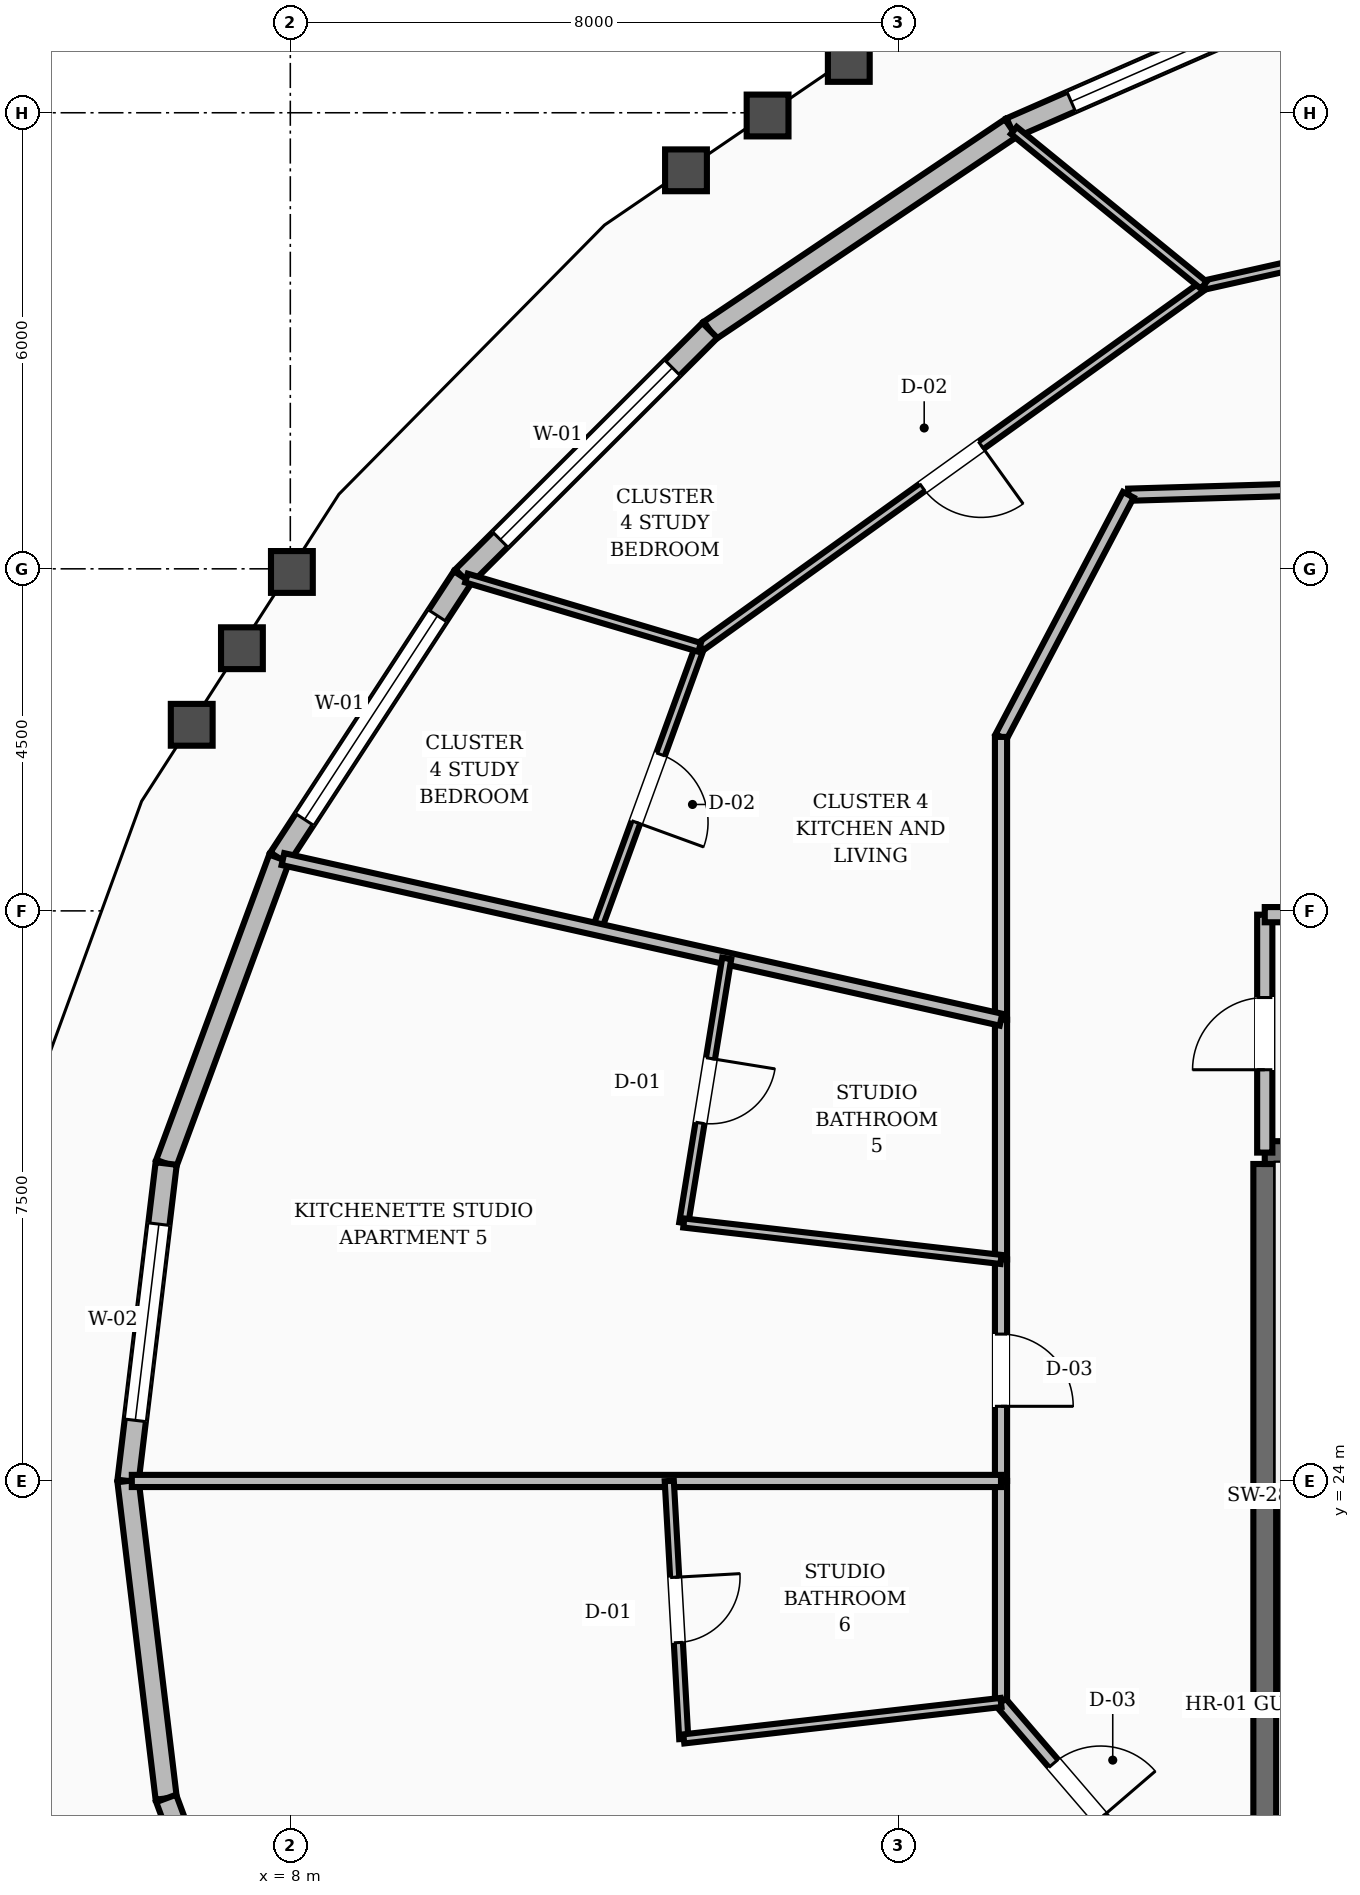
"""IFC4 building model, lengths in metres.
Left out: names, types, materials, properties, quantities, classifications, styles, units other than length and angle.
Written with IfcOpenShell. Run it as: python <this file> out.ifc"""

import sys

from ifc_helpers import new_model, si_unit, direction, frame, frame_2d, origin, place, context, subcontext, project, spatial, rectangle, extrude, element, fill, save


model = new_model("IFC4")
c1 = context("Model", 3, precision=1e-05, world=origin(), true_north=direction((0.0, 1.0)))
c2 = subcontext(c1, "Body", "Model", "MODEL_VIEW")
j1 = project(units=[si_unit("LENGTHUNIT", "METRE"), si_unit("PLANEANGLEUNIT", "RADIAN")], contexts=[c1])
p1 = place(None, origin())
s1 = spatial("IfcSite", under=j1, at=p1, CompositionType="ELEMENT")
p2 = place(p1, origin())
s2 = spatial("IfcBuilding", under=s1, at=p2, CompositionType="ELEMENT")
p3 = place(p2, frame((0.0, 0.0, 167.6)))
s3 = spatial("IfcBuildingStorey", under=s2, at=p3, CompositionType="ELEMENT", Elevation=167.6)
p4 = place(p3, frame((20.82, 19.43, 0.0), z_axis=(0.0, 0.0, 1.0), x_axis=(0.0, 1.0, 0.0)))
e1 = element("IfcWall", 1, at=p4, inside=s3, PredefinedType="SHEAR", context=c2, shape_type="SweptSolid", body=[
    extrude(rectangle(XDim=8.74, YDim=0.3, at=frame_2d((4.37, 0.0))), origin(), (0.0, 0.0, 1.0), 3.6),
])
p5 = place(p3, frame((20.82, 28.32, 0.0), z_axis=(0.0, 0.0, 1.0), x_axis=(1.0, 0.0, 0.0)))
e2 = element("IfcWall", 2, at=p5, inside=s3, PredefinedType="SHEAR", context=c2, shape_type="SweptSolid", body=[
    extrude(rectangle(XDim=3.6, YDim=0.3, at=frame_2d((1.8, 0.0))), origin(), (0.0, 0.0, 1.0), 3.6),
])
p6 = place(p3, frame((21.999, 43.777, 0.0), z_axis=(0.0, 0.0, 1.0), x_axis=(-0.916070979736, -0.401016159381, 0.0)))
e3 = element("IfcWall", 3, at=p6, inside=s3, PredefinedType="STANDARD", context=c2, shape_type="SweptSolid", body=[
    extrude(rectangle(XDim=4.933, YDim=0.28, at=frame_2d((2.466, 0.0))), origin(), (0.0, 0.0, 1.0), 2.82),
])
p7 = place(p6, frame((0.866, 0.0, 0.8)))
e4 = element("IfcOpeningElement", 4, at=p7, cuts=e3, PredefinedType="OPENING", context=c2, shape_type="SweptSolid", body=[
    extrude(rectangle(XDim=3.2, YDim=1.65, at=frame_2d((1.6, 0.825))), frame((0.0, 0.15, 0.0), z_axis=(0.0, -1.0, 0.0), x_axis=(1.0, 0.0, 0.0)), (0.0, 0.0, 1.0), 0.3),
])
p8 = place(p3, frame((17.48, 41.799, 0.0), z_axis=(0.0, 0.0, 1.0), x_axis=(-0.829911180813, -0.557895538575, 0.0)))
e5 = element("IfcWall", 5, at=p8, inside=s3, PredefinedType="STANDARD", context=c2, shape_type="SweptSolid", body=[
    extrude(rectangle(XDim=4.772, YDim=0.28, at=frame_2d((2.386, 0.0))), origin(), (0.0, 0.0, 1.0), 2.82),
])
p9 = place(p3, frame((13.52, 39.137, 0.0), z_axis=(0.0, 0.0, 1.0), x_axis=(-0.707797600077, -0.706415286729, 0.0)))
e6 = element("IfcWall", 6, at=p9, inside=s3, PredefinedType="STANDARD", context=c2, shape_type="SweptSolid", body=[
    extrude(rectangle(XDim=4.592, YDim=0.28, at=frame_2d((2.296, 0.0))), origin(), (0.0, 0.0, 1.0), 2.82),
])
p10 = place(p9, frame((0.696, 0.0, 0.8)))
e7 = element("IfcOpeningElement", 7, at=p10, cuts=e6, PredefinedType="OPENING", context=c2, shape_type="SweptSolid", body=[
    extrude(rectangle(XDim=3.2, YDim=1.65, at=frame_2d((1.6, 0.825))), frame((0.0, 0.15, 0.0), z_axis=(0.0, -1.0, 0.0), x_axis=(1.0, 0.0, 0.0)), (0.0, 0.0, 1.0), 0.3),
])
p11 = place(p3, frame((10.269, 35.893, 0.0), z_axis=(0.0, 0.0, 1.0), x_axis=(-0.546488523779, -0.837466592395, 0.0)))
e8 = element("IfcWall", 8, at=p11, inside=s3, PredefinedType="STANDARD", context=c2, shape_type="SweptSolid", body=[
    extrude(rectangle(XDim=4.419, YDim=0.28, at=frame_2d((2.209, 0.0))), origin(), (0.0, 0.0, 1.0), 2.82),
])
p12 = place(p11, frame((0.61, 0.0, 0.8)))
e9 = element("IfcOpeningElement", 9, at=p12, cuts=e8, PredefinedType="OPENING", context=c2, shape_type="SweptSolid", body=[
    extrude(rectangle(XDim=3.2, YDim=1.65, at=frame_2d((1.6, 0.825))), frame((0.0, 0.15, 0.0), z_axis=(0.0, -1.0, 0.0), x_axis=(1.0, 0.0, 0.0)), (0.0, 0.0, 1.0), 0.3),
])
p13 = place(p3, frame((7.854, 32.192, 0.0), z_axis=(0.0, 0.0, 1.0), x_axis=(-0.34732178329, -0.937746009777, 0.0)))
e10 = element("IfcWall", 10, at=p13, inside=s3, PredefinedType="STANDARD", context=c2, shape_type="SweptSolid", body=[
    extrude(rectangle(XDim=4.282, YDim=0.28, at=frame_2d((2.141, 0.0))), origin(), (0.0, 0.0, 1.0), 2.82),
])
p14 = place(p3, frame((6.367, 28.176, 0.0), z_axis=(0.0, 0.0, 1.0), x_axis=(-0.119390105597, -0.992847421654, 0.0)))
e11 = element("IfcWall", 11, at=p14, inside=s3, PredefinedType="STANDARD", context=c2, shape_type="SweptSolid", body=[
    extrude(rectangle(XDim=4.206, YDim=0.28, at=frame_2d((2.103, 0.0))), origin(), (0.0, 0.0, 1.0), 2.82),
])
p15 = place(p14, frame((0.803, 0.0, 0.8)))
e12 = element("IfcOpeningElement", 12, at=p15, cuts=e11, PredefinedType="OPENING", context=c2, shape_type="SweptSolid", body=[
    extrude(rectangle(XDim=2.6, YDim=1.65, at=frame_2d((1.3, 0.825))), frame((0.0, 0.15, 0.0), z_axis=(0.0, -1.0, 0.0), x_axis=(1.0, 0.0, 0.0)), (0.0, 0.0, 1.0), 0.3),
])
p16 = place(p3, frame((5.865, 24.0, 0.0), z_axis=(0.0, 0.0, 1.0), x_axis=(0.119390105597, -0.992847421654, 0.0)))
e13 = element("IfcWall", 13, at=p16, inside=s3, PredefinedType="STANDARD", context=c2, shape_type="SweptSolid", body=[
    extrude(rectangle(XDim=4.206, YDim=0.28, at=frame_2d((2.103, 0.0))), origin(), (0.0, 0.0, 1.0), 2.82),
])
p17 = place(p3, frame((6.367, 19.824, 0.0), z_axis=(0.0, 0.0, 1.0), x_axis=(0.34732178329, -0.937746009777, 0.0)))
e14 = element("IfcWall", 14, at=p17, inside=s3, PredefinedType="STANDARD", context=c2, shape_type="SweptSolid", body=[
    extrude(rectangle(XDim=4.282, YDim=0.28, at=frame_2d((2.141, 0.0))), origin(), (0.0, 0.0, 1.0), 2.82),
])
p18 = place(p3, frame((20.82, 28.32, 0.0), z_axis=(0.0, 0.0, 1.0), x_axis=(0.0, 1.0, 0.0)))
e15 = element("IfcWall", 15, at=p18, inside=s3, PredefinedType="SOLIDWALL", context=c2, shape_type="SweptSolid", body=[
    extrude(rectangle(XDim=3.13, YDim=0.2, at=frame_2d((1.565, 0.0))), origin(), (0.0, 0.0, 1.0), 2.8),
])
p19 = place(p18, frame((1.09, 0.0, 0.0)))
e16 = element("IfcOpeningElement", 16, at=p19, cuts=e15, PredefinedType="OPENING", context=c2, shape_type="SweptSolid", body=[
    extrude(rectangle(XDim=0.95, YDim=2.1, at=frame_2d((0.475, 1.05))), frame((0.0, 0.11, 0.0), z_axis=(0.0, -1.0, 0.0), x_axis=(1.0, 0.0, 0.0)), (0.0, 0.0, 1.0), 0.22),
])
p20 = place(p3, frame((20.82, 31.45, 0.0), z_axis=(0.0, 0.0, 1.0), x_axis=(1.0, 0.0, 0.0)))
e17 = element("IfcWall", 17, at=p20, inside=s3, PredefinedType="SOLIDWALL", context=c2, shape_type="SweptSolid", body=[
    extrude(rectangle(XDim=3.98, YDim=0.2, at=frame_2d((1.99, 0.0))), origin(), (0.0, 0.0, 1.0), 2.8),
])
p21 = place(p3, frame((23.247, 37.1, 0.0), z_axis=(0.0, 0.0, 1.0), x_axis=(-0.999561990195, -0.029594387265, 0.0)))
e18 = element("IfcWall", 18, at=p21, inside=s3, PredefinedType="SOLIDWALL", context=c2, shape_type="SweptSolid", body=[
    extrude(rectangle(XDim=4.224, YDim=0.16, at=frame_2d((2.112, 0.0))), origin(), (0.0, 0.0, 1.0), 2.8),
])
p22 = place(p3, frame((19.025, 36.975, 0.0), z_axis=(0.0, 0.0, 1.0), x_axis=(-0.46527115782, -0.885168204185, 0.0)))
e19 = element("IfcWall", 19, at=p22, inside=s3, PredefinedType="SOLIDWALL", context=c2, shape_type="SweptSolid", body=[
    extrude(rectangle(XDim=3.6, YDim=0.16, at=frame_2d((1.8, 0.0))), origin(), (0.0, 0.0, 1.0), 2.8),
])
p23 = place(p3, frame((17.35, 33.789, 0.0), z_axis=(0.0, 0.0, 1.0), x_axis=(0.0, -1.0, 0.0)))
e20 = element("IfcWall", 20, at=p23, inside=s3, PredefinedType="SOLIDWALL", context=c2, shape_type="SweptSolid", body=[
    extrude(rectangle(XDim=3.721, YDim=0.16, at=frame_2d((1.86, 0.0))), origin(), (0.0, 0.0, 1.0), 2.8),
])
p24 = place(p3, frame((17.35, 30.068, 0.0), z_axis=(0.0, 0.0, 1.0), x_axis=(0.0, -1.0, 0.0)))
e21 = element("IfcWall", 21, at=p24, inside=s3, PredefinedType="SOLIDWALL", context=c2, shape_type="SweptSolid", body=[
    extrude(rectangle(XDim=3.154, YDim=0.16, at=frame_2d((1.577, 0.0))), origin(), (0.0, 0.0, 1.0), 2.8),
])
p25 = place(p3, frame((17.35, 26.914, 0.0), z_axis=(0.0, 0.0, 1.0), x_axis=(0.0, -1.0, 0.0)))
e22 = element("IfcWall", 22, at=p25, inside=s3, PredefinedType="SOLIDWALL", context=c2, shape_type="SweptSolid", body=[
    extrude(rectangle(XDim=2.914, YDim=0.16, at=frame_2d((1.457, 0.0))), origin(), (0.0, 0.0, 1.0), 2.8),
])
p26 = place(p25, frame((0.982, 0.0, 0.0)))
e23 = element("IfcOpeningElement", 23, at=p26, cuts=e22, PredefinedType="OPENING", context=c2, shape_type="SweptSolid", body=[
    extrude(rectangle(XDim=0.95, YDim=2.1, at=frame_2d((0.475, 1.05))), frame((0.0, 0.09, 0.0), z_axis=(0.0, -1.0, 0.0), x_axis=(1.0, 0.0, 0.0)), (0.0, 0.0, 1.0), 0.18),
])
p27 = place(p3, frame((17.35, 24.0, 0.0), z_axis=(0.0, 0.0, 1.0), x_axis=(0.0, -1.0, 0.0)))
e24 = element("IfcWall", 24, at=p27, inside=s3, PredefinedType="SOLIDWALL", context=c2, shape_type="SweptSolid", body=[
    extrude(rectangle(XDim=2.914, YDim=0.16, at=frame_2d((1.457, 0.0))), origin(), (0.0, 0.0, 1.0), 2.8),
])
p28 = place(p3, frame((17.35, 21.086, 0.0), z_axis=(0.0, 0.0, 1.0), x_axis=(0.652022797448, -0.758199361388, 0.0)))
e25 = element("IfcWall", 25, at=p28, inside=s3, PredefinedType="SOLIDWALL", context=c2, shape_type="SweptSolid", body=[
    extrude(rectangle(XDim=3.067, YDim=0.16, at=frame_2d((1.534, 0.0))), origin(), (0.0, 0.0, 1.0), 2.8),
])
p29 = place(p28, frame((1.059, 0.0, 0.0)))
e26 = element("IfcOpeningElement", 26, at=p29, cuts=e25, PredefinedType="OPENING", context=c2, shape_type="SweptSolid", body=[
    extrude(rectangle(XDim=0.95, YDim=2.1, at=frame_2d((0.475, 1.05))), frame((0.0, 0.09, 0.0), z_axis=(0.0, -1.0, 0.0), x_axis=(1.0, 0.0, 0.0)), (0.0, 0.0, 1.0), 0.18),
])
p30 = place(p3, frame((27.998, 41.521, 0.0), z_axis=(0.0, 0.0, 1.0), x_axis=(-0.975756725435, -0.218857973964, 0.0)))
e27 = element("IfcWall", 27, at=p30, inside=s3, PredefinedType="PARTITIONING", context=c2, shape_type="SweptSolid", body=[
    extrude(rectangle(XDim=8.179, YDim=0.12, at=frame_2d((4.089, 0.0))), origin(), (0.0, 0.0, 1.0), 2.8),
])
p31 = place(p30, frame((5.011, 0.0, 0.0)))
e28 = element("IfcOpeningElement", 28, at=p31, cuts=e27, PredefinedType="OPENING", context=c2, shape_type="SweptSolid", body=[
    extrude(rectangle(XDim=0.95, YDim=2.1, at=frame_2d((0.475, 1.05))), frame((0.0, 0.07, 0.0), z_axis=(0.0, -1.0, 0.0), x_axis=(1.0, 0.0, 0.0)), (0.0, 0.0, 1.0), 0.14),
])
p32 = place(p3, frame((20.018, 39.731, 0.0), z_axis=(0.0, 0.0, 1.0), x_axis=(-0.812175175791, -0.583413647277, 0.0)))
e29 = element("IfcWall", 29, at=p32, inside=s3, PredefinedType="PARTITIONING", context=c2, shape_type="SweptSolid", body=[
    extrude(rectangle(XDim=8.167, YDim=0.12, at=frame_2d((4.083, 0.0))), origin(), (0.0, 0.0, 1.0), 2.8),
])
p33 = place(p32, frame((3.608, 0.0, 0.0)))
e30 = element("IfcOpeningElement", 30, at=p33, cuts=e29, PredefinedType="OPENING", context=c2, shape_type="SweptSolid", body=[
    extrude(rectangle(XDim=0.95, YDim=2.1, at=frame_2d((0.475, 1.05))), frame((0.0, 0.07, 0.0), z_axis=(0.0, -1.0, 0.0), x_axis=(1.0, 0.0, 0.0)), (0.0, 0.0, 1.0), 0.14),
])
p34 = place(p3, frame((20.018, 39.731, 0.0), z_axis=(0.0, 0.0, 1.0), x_axis=(-0.775258339424, 0.631644288467, 0.0)))
e31 = element("IfcWall", 31, at=p34, inside=s3, PredefinedType="PARTITIONING", context=c2, shape_type="SweptSolid", body=[
    extrude(rectangle(XDim=3.223, YDim=0.12, at=frame_2d((1.612, 0.0))), origin(), (0.0, 0.0, 1.0), 2.8),
])
p35 = place(p3, frame((13.385, 34.967, 0.0), z_axis=(0.0, 0.0, 1.0), x_axis=(-0.34255715009, -0.939496992503, 0.0)))
e32 = element("IfcWall", 32, at=p35, inside=s3, PredefinedType="PARTITIONING", context=c2, shape_type="SweptSolid", body=[
    extrude(rectangle(XDim=3.948, YDim=0.12, at=frame_2d((1.974, 0.0))), origin(), (0.0, 0.0, 1.0), 2.8),
])
p36 = place(p35, frame((1.499, 0.0, 0.0)))
e33 = element("IfcOpeningElement", 33, at=p36, cuts=e32, PredefinedType="OPENING", context=c2, shape_type="SweptSolid", body=[
    extrude(rectangle(XDim=0.95, YDim=2.1, at=frame_2d((0.475, 1.05))), frame((0.0, 0.07, 0.0), z_axis=(0.0, -1.0, 0.0), x_axis=(1.0, 0.0, 0.0)), (0.0, 0.0, 1.0), 0.14),
])
p37 = place(p3, frame((13.385, 34.967, 0.0), z_axis=(0.0, 0.0, 1.0), x_axis=(-0.958568452923, 0.284862284378, 0.0)))
e34 = element("IfcWall", 34, at=p37, inside=s3, PredefinedType="PARTITIONING", context=c2, shape_type="SweptSolid", body=[
    extrude(rectangle(XDim=3.2, YDim=0.12, at=frame_2d((1.6, 0.0))), origin(), (0.0, 0.0, 1.0), 2.8),
])
p38 = place(p3, frame((17.35, 30.068, 0.0), z_axis=(0.0, 0.0, 1.0), x_axis=(-0.975886456244, 0.218278777072, 0.0)))
e35 = element("IfcWall", 35, at=p38, inside=s3, PredefinedType="SOLIDWALL", context=c2, shape_type="SweptSolid", body=[
    extrude(rectangle(XDim=9.68, YDim=0.16, at=frame_2d((4.84, 0.0))), origin(), (0.0, 0.0, 1.0), 2.8),
])
p39 = place(p3, frame((13.742, 30.875, 0.0), z_axis=(0.0, 0.0, 1.0), x_axis=(-0.160244329289, -0.987077380417, 0.0)))
e36 = element("IfcWall", 36, at=p39, inside=s3, PredefinedType="PARTITIONING", context=c2, shape_type="SweptSolid", body=[
    extrude(rectangle(XDim=3.527, YDim=0.12, at=frame_2d((1.764, 0.0))), origin(), (0.0, 0.0, 1.0), 2.8),
])
p40 = place(p39, frame((1.333, 0.0, 0.0)))
e37 = element("IfcOpeningElement", 37, at=p40, cuts=e36, PredefinedType="OPENING", context=c2, shape_type="SweptSolid", body=[
    extrude(rectangle(XDim=0.86, YDim=2.1, at=frame_2d((0.43, 1.05))), frame((0.0, 0.07, 0.0), z_axis=(0.0, -1.0, 0.0), x_axis=(1.0, 0.0, 0.0)), (0.0, 0.0, 1.0), 0.14),
])
p41 = place(p3, frame((17.35, 26.914, 0.0), z_axis=(0.0, 0.0, 1.0), x_axis=(-0.993458472939, 0.114193968957, 0.0)))
e38 = element("IfcWall", 38, at=p41, inside=s3, PredefinedType="PARTITIONING", context=c2, shape_type="SweptSolid", body=[
    extrude(rectangle(XDim=4.201, YDim=0.12, at=frame_2d((2.101, 0.0))), origin(), (0.0, 0.0, 1.0), 2.8),
])
p42 = place(p3, frame((17.35, 24.0, 0.0), z_axis=(0.0, 0.0, 1.0), x_axis=(-1.0, 0.0, 0.0)))
e39 = element("IfcWall", 39, at=p42, inside=s3, PredefinedType="SOLIDWALL", context=c2, shape_type="SweptSolid", body=[
    extrude(rectangle(XDim=11.435, YDim=0.16, at=frame_2d((5.718, 0.0))), origin(), (0.0, 0.0, 1.0), 2.8),
])
p43 = place(p3, frame((12.986, 24.0, 0.0), z_axis=(0.0, 0.0, 1.0), x_axis=(0.056166143668, -0.998421436221, 0.0)))
e40 = element("IfcWall", 40, at=p43, inside=s3, PredefinedType="PARTITIONING", context=c2, shape_type="SweptSolid", body=[
    extrude(rectangle(XDim=3.399, YDim=0.12, at=frame_2d((1.7, 0.0))), origin(), (0.0, 0.0, 1.0), 2.8),
])
p44 = place(p43, frame((1.27, 0.0, 0.0)))
e41 = element("IfcOpeningElement", 41, at=p44, cuts=e40, PredefinedType="OPENING", context=c2, shape_type="SweptSolid", body=[
    extrude(rectangle(XDim=0.86, YDim=2.1, at=frame_2d((0.43, 1.05))), frame((0.0, 0.07, 0.0), z_axis=(0.0, -1.0, 0.0), x_axis=(1.0, 0.0, 0.0)), (0.0, 0.0, 1.0), 0.14),
])
p45 = place(p3, frame((17.35, 21.086, 0.0), z_axis=(0.0, 0.0, 1.0), x_axis=(-0.993458472939, -0.114193968957, 0.0)))
e42 = element("IfcWall", 42, at=p45, inside=s3, PredefinedType="PARTITIONING", context=c2, shape_type="SweptSolid", body=[
    extrude(rectangle(XDim=4.201, YDim=0.12, at=frame_2d((2.101, 0.0))), origin(), (0.0, 0.0, 1.0), 2.8),
])
p46 = place(p7, origin())
e43 = element("IfcWindow", 43, at=p46, inside=s3, PartitioningType="SINGLE_PANEL", PredefinedType="WINDOW", context=c2, shape_type="SweptSolid", body=[
    extrude(rectangle(XDim=3.2, YDim=1.65, at=frame_2d((1.6, 0.825))), frame((0.0, 0.03, 0.0), z_axis=(0.0, -1.0, 0.0), x_axis=(1.0, 0.0, 0.0)), (0.0, 0.0, 1.0), 0.06),
])
fill(e4, e43)
p47 = place(p10, origin())
e44 = element("IfcWindow", 44, at=p47, inside=s3, PartitioningType="SINGLE_PANEL", PredefinedType="WINDOW", context=c2, shape_type="SweptSolid", body=[
    extrude(rectangle(XDim=3.2, YDim=1.65, at=frame_2d((1.6, 0.825))), frame((0.0, 0.03, 0.0), z_axis=(0.0, -1.0, 0.0), x_axis=(1.0, 0.0, 0.0)), (0.0, 0.0, 1.0), 0.06),
])
fill(e7, e44)
p48 = place(p12, origin())
e45 = element("IfcWindow", 45, at=p48, inside=s3, PartitioningType="SINGLE_PANEL", PredefinedType="WINDOW", context=c2, shape_type="SweptSolid", body=[
    extrude(rectangle(XDim=3.2, YDim=1.65, at=frame_2d((1.6, 0.825))), frame((0.0, 0.03, 0.0), z_axis=(0.0, -1.0, 0.0), x_axis=(1.0, 0.0, 0.0)), (0.0, 0.0, 1.0), 0.06),
])
fill(e9, e45)
p49 = place(p15, origin())
e46 = element("IfcWindow", 46, at=p49, inside=s3, PartitioningType="SINGLE_PANEL", PredefinedType="WINDOW", context=c2, shape_type="SweptSolid", body=[
    extrude(rectangle(XDim=2.6, YDim=1.65, at=frame_2d((1.3, 0.825))), frame((0.0, 0.03, 0.0), z_axis=(0.0, -1.0, 0.0), x_axis=(1.0, 0.0, 0.0)), (0.0, 0.0, 1.0), 0.06),
])
fill(e12, e46)
p50 = place(p19, origin())
e47 = element("IfcDoor", 47, at=p50, inside=s3, OperationType="SINGLE_SWING_LEFT", PredefinedType="DOOR", context=c2, shape_type="SweptSolid", body=[
    extrude(rectangle(XDim=0.95, YDim=2.1, at=frame_2d((0.475, 1.05))), frame((0.0, 0.025, 0.0), z_axis=(0.0, -1.0, 0.0), x_axis=(1.0, 0.0, 0.0)), (0.0, 0.0, 1.0), 0.05),
])
fill(e16, e47)
p51 = place(p33, origin())
e48 = element("IfcDoor", 48, at=p51, inside=s3, OperationType="SINGLE_SWING_LEFT", PredefinedType="DOOR", context=c2, shape_type="SweptSolid", body=[
    extrude(rectangle(XDim=0.95, YDim=2.1, at=frame_2d((0.475, 1.05))), frame((0.0, 0.025, 0.0), z_axis=(0.0, -1.0, 0.0), x_axis=(1.0, 0.0, 0.0)), (0.0, 0.0, 1.0), 0.05),
])
fill(e30, e48)
p52 = place(p36, origin())
e49 = element("IfcDoor", 49, at=p52, inside=s3, OperationType="SINGLE_SWING_RIGHT", PredefinedType="DOOR", context=c2, shape_type="SweptSolid", body=[
    extrude(rectangle(XDim=0.95, YDim=2.1, at=frame_2d((0.475, 1.05))), frame((0.0, 0.025, 0.0), z_axis=(0.0, -1.0, 0.0), x_axis=(1.0, 0.0, 0.0)), (0.0, 0.0, 1.0), 0.05),
])
fill(e33, e49)
p53 = place(p40, origin())
e50 = element("IfcDoor", 50, at=p53, inside=s3, OperationType="SINGLE_SWING_LEFT", PredefinedType="DOOR", context=c2, shape_type="SweptSolid", body=[
    extrude(rectangle(XDim=0.86, YDim=2.1, at=frame_2d((0.43, 1.05))), frame((0.0, 0.025, 0.0), z_axis=(0.0, -1.0, 0.0), x_axis=(1.0, 0.0, 0.0)), (0.0, 0.0, 1.0), 0.05),
])
fill(e37, e50)
p54 = place(p26, origin())
e51 = element("IfcDoor", 51, at=p54, inside=s3, OperationType="SINGLE_SWING_RIGHT", PredefinedType="DOOR", context=c2, shape_type="SweptSolid", body=[
    extrude(rectangle(XDim=0.95, YDim=2.1, at=frame_2d((0.475, 1.05))), frame((0.0, 0.025, 0.0), z_axis=(0.0, -1.0, 0.0), x_axis=(1.0, 0.0, 0.0)), (0.0, 0.0, 1.0), 0.05),
])
fill(e23, e51)
p55 = place(p44, origin())
e52 = element("IfcDoor", 52, at=p55, inside=s3, OperationType="SINGLE_SWING_LEFT", PredefinedType="DOOR", context=c2, shape_type="SweptSolid", body=[
    extrude(rectangle(XDim=0.86, YDim=2.1, at=frame_2d((0.43, 1.05))), frame((0.0, 0.025, 0.0), z_axis=(0.0, -1.0, 0.0), x_axis=(1.0, 0.0, 0.0)), (0.0, 0.0, 1.0), 0.05),
])
fill(e41, e52)
p56 = place(p29, origin())
e53 = element("IfcDoor", 53, at=p56, inside=s3, OperationType="SINGLE_SWING_RIGHT", PredefinedType="DOOR", context=c2, shape_type="SweptSolid", body=[
    extrude(rectangle(XDim=0.95, YDim=2.1, at=frame_2d((0.475, 1.05))), frame((0.0, 0.025, 0.0), z_axis=(0.0, -1.0, 0.0), x_axis=(1.0, 0.0, 0.0)), (0.0, 0.0, 1.0), 0.05),
])
fill(e26, e53)
save(model, sys.argv[1])
